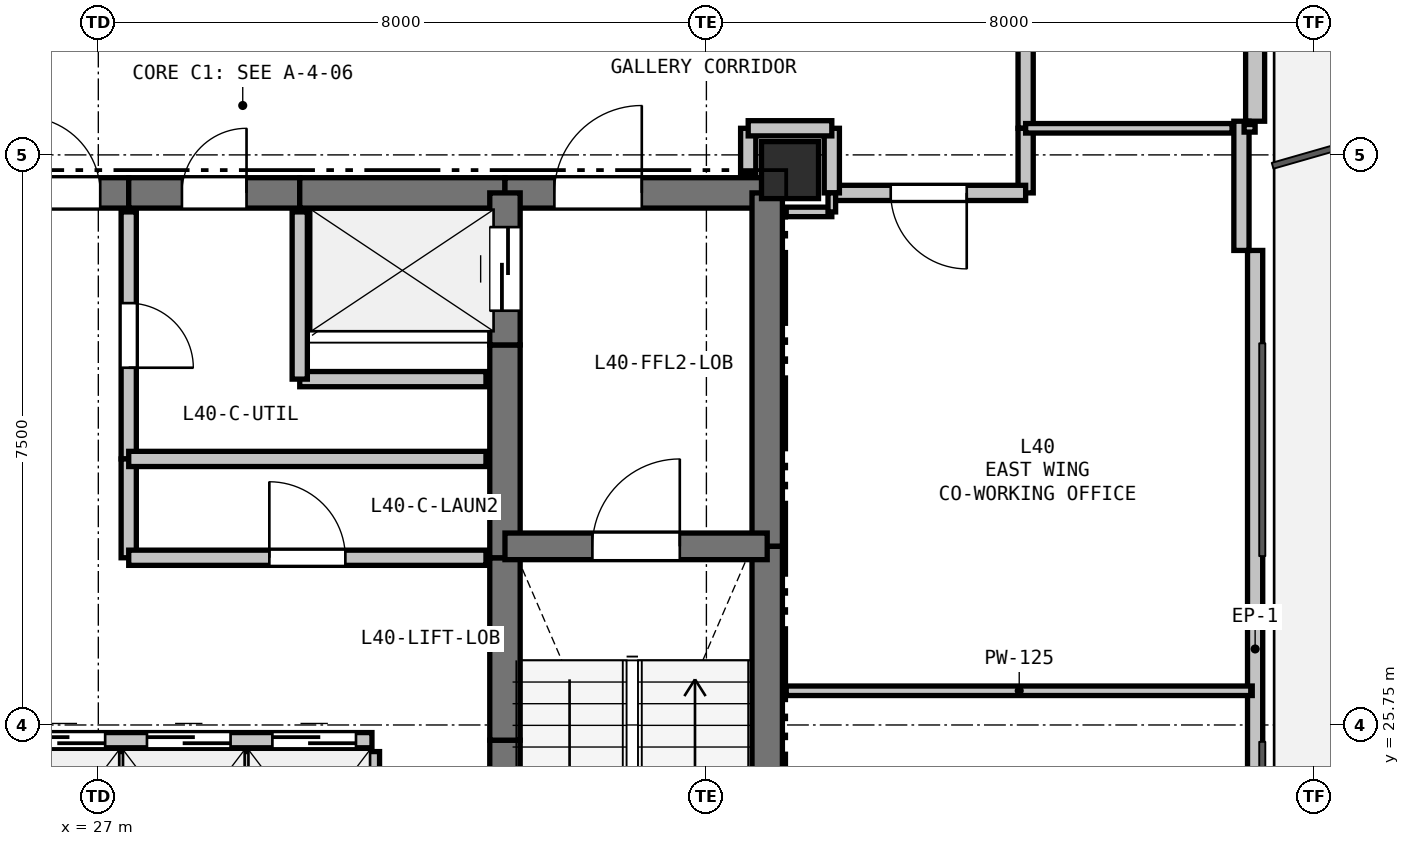
"""IFC4 building model, lengths in metres.
Left out: names, types, materials, properties, quantities, classifications, styles, units other than length and angle.
Written with IfcOpenShell. Run it as: python <this file> out.ifc"""

import sys

from ifc_helpers import new_model, si_unit, direction, frame, frame_2d, origin, origin_2d, place, context, subcontext, project, spatial, rectangle, extrude, element, fill, save


model = new_model("IFC4")
c1 = context("Model", 3, precision=1e-05, world=origin(), true_north=direction((0.0, 1.0)))
c2 = subcontext(c1, "Body", "Model", "MODEL_VIEW")
j1 = project(units=[si_unit("LENGTHUNIT", "METRE"), si_unit("PLANEANGLEUNIT", "RADIAN")], contexts=[c1])
p1 = place(None, origin())
s1 = spatial("IfcSite", under=j1, at=p1, CompositionType="ELEMENT")
p2 = place(p1, origin())
s2 = spatial("IfcBuilding", under=s1, at=p2, CompositionType="ELEMENT")
p3 = place(p2, frame((0.0, 0.0, 144.3)))
s3 = spatial("IfcBuildingStorey", under=s2, at=p3, CompositionType="ELEMENT", Elevation=144.3)
p4 = place(p3, frame((36.1, 33.05, 0.0), z_axis=(0.0, 0.0, 1.0), x_axis=(1.0, 0.0, 0.0)))
e1 = element("IfcColumn", 1, at=p4, inside=s3, PredefinedType="COLUMN", context=c2, shape_type="SweptSolid", body=[
    extrude(rectangle(XDim=0.75, YDim=0.75, at=origin_2d()), origin(), (0.0, 0.0, 1.0), 3.3),
])
p5 = place(p3, frame((42.219, 44.879, 0.0), z_axis=(0.0, 0.0, 1.0), x_axis=(0.0, -1.0, 0.0)))
e2 = element("IfcWall", 2, at=p5, inside=s3, PredefinedType="SOLIDWALL", context=c2, shape_type="SweptSolid", body=[
    extrude(rectangle(XDim=11.186, YDim=0.25, at=frame_2d((5.593, 0.0))), origin(), (0.0, 0.0, 1.0), 2.68),
])
p6 = place(p5, frame((8.109, 0.0, 0.0)))
e3 = element("IfcOpeningElement", 3, at=p6, cuts=e2, PredefinedType="OPENING", context=c2, shape_type="SweptSolid", body=[
    extrude(rectangle(XDim=1.1, YDim=2.1, at=frame_2d((0.55, 1.05))), frame((0.0, 0.135, 0.0), z_axis=(0.0, -1.0, 0.0), x_axis=(1.0, 0.0, 0.0)), (0.0, 0.0, 1.0), 0.27),
])
p7 = place(p3, frame((42.219, 31.993, 0.0), z_axis=(0.0, 0.0, 1.0), x_axis=(0.0, -1.0, 0.0)))
e4 = element("IfcWall", 4, at=p7, inside=s3, PredefinedType="PARAPET", context=c2, shape_type="SweptSolid", body=[
    extrude(rectangle(XDim=10.486, YDim=0.2, at=frame_2d((5.243, 0.0))), origin(), (0.0, 0.0, 1.0), 0.2),
])
p8 = place(p3, frame((42.039, 33.693, 0.0), z_axis=(0.0, 0.0, 1.0), x_axis=(0.0, -1.0, 0.0)))
e5 = element("IfcWall", 5, at=p8, inside=s3, PredefinedType="PARAPET", context=c2, shape_type="SweptSolid", body=[
    extrude(rectangle(XDim=1.7, YDim=0.2, at=frame_2d((0.85, 0.0))), origin(), (0.0, 0.0, 1.0), 2.68),
])
p9 = place(p3, frame((25.65, 32.75, 0.0), z_axis=(0.0, 0.0, 1.0), x_axis=(1.0, 0.0, 0.0)))
e6 = element("IfcWall", 6, at=p9, inside=s3, PredefinedType="SHEAR", context=c2, shape_type="SweptSolid", body=[
    extrude(rectangle(XDim=1.75, YDim=0.4, at=frame_2d((0.875, 0.0))), origin(), (0.0, 0.0, 1.0), 3.06),
])
p10 = place(p9, frame((0.375, 0.0, 0.0)))
e7 = element("IfcOpeningElement", 7, at=p10, cuts=e6, PredefinedType="OPENING", context=c2, shape_type="SweptSolid", body=[
    extrude(rectangle(XDim=1.0, YDim=2.15, at=frame_2d((0.5, 1.075))), frame((0.0, 0.21, 0.0), z_axis=(0.0, -1.0, 0.0), x_axis=(1.0, 0.0, 0.0)), (0.0, 0.0, 1.0), 0.42),
])
p11 = place(p3, frame((27.4, 32.75, 0.0), z_axis=(0.0, 0.0, 1.0), x_axis=(1.0, 0.0, 0.0)))
e8 = element("IfcWall", 8, at=p11, inside=s3, PredefinedType="SHEAR", context=c2, shape_type="SweptSolid", body=[
    extrude(rectangle(XDim=2.25, YDim=0.4, at=frame_2d((1.125, 0.0))), origin(), (0.0, 0.0, 1.0), 3.06),
])
p12 = place(p11, frame((0.7, 0.0, 0.0)))
e9 = element("IfcOpeningElement", 9, at=p12, cuts=e8, PredefinedType="OPENING", context=c2, shape_type="SweptSolid", body=[
    extrude(rectangle(XDim=0.85, YDim=2.1, at=frame_2d((0.425, 1.05))), frame((0.0, 0.21, 0.0), z_axis=(0.0, -1.0, 0.0), x_axis=(1.0, 0.0, 0.0)), (0.0, 0.0, 1.0), 0.42),
])
p13 = place(p3, frame((29.65, 32.75, 0.0), z_axis=(0.0, 0.0, 1.0), x_axis=(1.0, 0.0, 0.0)))
e10 = element("IfcWall", 10, at=p13, inside=s3, PredefinedType="SHEAR", context=c2, shape_type="SweptSolid", body=[
    extrude(rectangle(XDim=2.7, YDim=0.4, at=frame_2d((1.35, 0.0))), origin(), (0.0, 0.0, 1.0), 3.06),
])
p14 = place(p3, frame((32.35, 32.75, 0.0), z_axis=(0.0, 0.0, 1.0), x_axis=(1.0, 0.0, 0.0)))
e11 = element("IfcWall", 11, at=p14, inside=s3, PredefinedType="SHEAR", context=c2, shape_type="SweptSolid", body=[
    extrude(rectangle(XDim=3.45, YDim=0.4, at=frame_2d((1.725, 0.0))), origin(), (0.0, 0.0, 1.0), 3.06),
])
p15 = place(p14, frame((0.65, 0.0, 0.0)))
e12 = element("IfcOpeningElement", 12, at=p15, cuts=e11, PredefinedType="OPENING", context=c2, shape_type="SweptSolid", body=[
    extrude(rectangle(XDim=1.15, YDim=2.15, at=frame_2d((0.575, 1.075))), frame((0.0, 0.21, 0.0), z_axis=(0.0, -1.0, 0.0), x_axis=(1.0, 0.0, 0.0)), (0.0, 0.0, 1.0), 0.42),
])
p16 = place(p3, frame((35.8, 32.75, 0.0), z_axis=(0.0, 0.0, 1.0), x_axis=(0.0, -1.0, 0.0)))
e13 = element("IfcWall", 13, at=p16, inside=s3, PredefinedType="SHEAR", context=c2, shape_type="SweptSolid", body=[
    extrude(rectangle(XDim=4.65, YDim=0.4, at=frame_2d((2.325, 0.0))), origin(), (0.0, 0.0, 1.0), 3.06),
])
p17 = place(p3, frame((35.8, 28.1, 0.0), z_axis=(0.0, 0.0, 1.0), x_axis=(0.0, -1.0, 0.0)))
e14 = element("IfcWall", 14, at=p17, inside=s3, PredefinedType="SHEAR", context=c2, shape_type="SweptSolid", body=[
    extrude(rectangle(XDim=7.35, YDim=0.4, at=frame_2d((3.675, 0.0))), origin(), (0.0, 0.0, 1.0), 3.06),
])
p18 = place(p3, frame((32.35, 20.75, 0.0), z_axis=(0.0, 0.0, 1.0), x_axis=(0.0, 1.0, 0.0)))
e15 = element("IfcWall", 15, at=p18, inside=s3, PredefinedType="SHEAR", context=c2, shape_type="SweptSolid", body=[
    extrude(rectangle(XDim=4.8, YDim=0.4, at=frame_2d((2.4, 0.0))), origin(), (0.0, 0.0, 1.0), 3.06),
])
p19 = place(p3, frame((32.35, 25.55, 0.0), z_axis=(0.0, 0.0, 1.0), x_axis=(0.0, 1.0, 0.0)))
e16 = element("IfcWall", 16, at=p19, inside=s3, PredefinedType="SHEAR", context=c2, shape_type="SweptSolid", body=[
    extrude(rectangle(XDim=2.4, YDim=0.4, at=frame_2d((1.2, 0.0))), origin(), (0.0, 0.0, 1.0), 3.06),
])
p20 = place(p3, frame((32.35, 27.95, 0.0), z_axis=(0.0, 0.0, 1.0), x_axis=(0.0, 1.0, 0.0)))
e17 = element("IfcWall", 17, at=p20, inside=s3, PredefinedType="SHEAR", context=c2, shape_type="SweptSolid", body=[
    extrude(rectangle(XDim=2.8, YDim=0.4, at=frame_2d((1.4, 0.0))), origin(), (0.0, 0.0, 1.0), 3.06),
])
p21 = place(p3, frame((32.35, 30.75, 0.0), z_axis=(0.0, 0.0, 1.0), x_axis=(0.0, 1.0, 0.0)))
e18 = element("IfcWall", 18, at=p21, inside=s3, PredefinedType="SHEAR", context=c2, shape_type="SweptSolid", body=[
    extrude(rectangle(XDim=2.0, YDim=0.4, at=frame_2d((1.0, 0.0))), origin(), (0.0, 0.0, 1.0), 3.06),
])
p22 = place(p21, frame((0.45, 0.0, 0.0)))
e19 = element("IfcOpeningElement", 19, at=p22, cuts=e18, PredefinedType="OPENING", context=c2, shape_type="SweptSolid", body=[
    extrude(rectangle(XDim=1.1, YDim=2.15, at=frame_2d((0.55, 1.075))), frame((0.0, 0.21, 0.0), z_axis=(0.0, -1.0, 0.0), x_axis=(1.0, 0.0, 0.0)), (0.0, 0.0, 1.0), 0.42),
])
p23 = place(p3, frame((32.35, 28.1, 0.0), z_axis=(0.0, 0.0, 1.0), x_axis=(1.0, 0.0, 0.0)))
e20 = element("IfcWall", 20, at=p23, inside=s3, PredefinedType="SHEAR", context=c2, shape_type="SweptSolid", body=[
    extrude(rectangle(XDim=3.45, YDim=0.35, at=frame_2d((1.725, 0.0))), origin(), (0.0, 0.0, 1.0), 3.06),
])
p24 = place(p23, frame((1.15, 0.0, 0.0)))
e21 = element("IfcOpeningElement", 21, at=p24, cuts=e20, PredefinedType="OPENING", context=c2, shape_type="SweptSolid", body=[
    extrude(rectangle(XDim=1.15, YDim=2.15, at=frame_2d((0.575, 1.075))), frame((0.0, 0.185, 0.0), z_axis=(0.0, -1.0, 0.0), x_axis=(1.0, 0.0, 0.0)), (0.0, 0.0, 1.0), 0.37),
])
p25 = place(p3, frame((25.65, 25.55, 0.0), z_axis=(0.0, 0.0, 1.0), x_axis=(1.0, 0.0, 0.0)))
e22 = element("IfcWall", 22, at=p25, inside=s3, PredefinedType="PARTITIONING", context=c2, shape_type="SweptSolid", body=[
    extrude(rectangle(XDim=4.95, YDim=0.2, at=frame_2d((2.475, 0.0))), origin(), (0.0, 0.0, 1.0), 3.06),
])
p26 = place(p25, frame((0.34, 0.0, 0.0)))
e23 = element("IfcOpeningElement", 23, at=p26, cuts=e22, PredefinedType="OPENING", context=c2, shape_type="SweptSolid", body=[
    extrude(rectangle(XDim=1.1, YDim=2.15, at=frame_2d((0.55, 1.075))), frame((0.0, 0.11, 0.0), z_axis=(0.0, -1.0, 0.0), x_axis=(1.0, 0.0, 0.0)), (0.0, 0.0, 1.0), 0.22),
])
p27 = place(p25, frame((1.99, 0.0, 0.0)))
e24 = element("IfcOpeningElement", 24, at=p27, cuts=e22, PredefinedType="OPENING", context=c2, shape_type="SweptSolid", body=[
    extrude(rectangle(XDim=1.1, YDim=2.15, at=frame_2d((0.55, 1.075))), frame((0.0, 0.11, 0.0), z_axis=(0.0, -1.0, 0.0), x_axis=(1.0, 0.0, 0.0)), (0.0, 0.0, 1.0), 0.22),
])
p28 = place(p25, frame((3.64, 0.0, 0.0)))
e25 = element("IfcOpeningElement", 25, at=p28, cuts=e22, PredefinedType="OPENING", context=c2, shape_type="SweptSolid", body=[
    extrude(rectangle(XDim=1.1, YDim=2.15, at=frame_2d((0.55, 1.075))), frame((0.0, 0.11, 0.0), z_axis=(0.0, -1.0, 0.0), x_axis=(1.0, 0.0, 0.0)), (0.0, 0.0, 1.0), 0.22),
])
p29 = place(p3, frame((32.1, 30.3, 0.0), z_axis=(0.0, 0.0, 1.0), x_axis=(-1.0, 0.0, 0.0)))
e26 = element("IfcWall", 26, at=p29, inside=s3, PredefinedType="PARTITIONING", context=c2, shape_type="SweptSolid", body=[
    extrude(rectangle(XDim=2.45, YDim=0.2, at=frame_2d((1.225, 0.0))), origin(), (0.0, 0.0, 1.0), 3.06),
])
p30 = place(p3, frame((29.65, 30.3, 0.0), z_axis=(0.0, 0.0, 1.0), x_axis=(0.0, 1.0, 0.0)))
e27 = element("IfcWall", 27, at=p30, inside=s3, PredefinedType="PARTITIONING", context=c2, shape_type="SweptSolid", body=[
    extrude(rectangle(XDim=2.2, YDim=0.2, at=frame_2d((1.1, 0.0))), origin(), (0.0, 0.0, 1.0), 3.06),
])
p31 = place(p3, frame((27.3, 25.4, 0.0), z_axis=(0.0, 0.0, 1.0), x_axis=(0.0, -1.0, 0.0)))
e28 = element("IfcWall", 28, at=p31, inside=s3, PredefinedType="PARTITIONING", context=c2, shape_type="SweptSolid", body=[
    extrude(rectangle(XDim=2.2, YDim=0.1, at=frame_2d((1.1, 0.0))), origin(), (0.0, 0.0, 1.0), 3.06),
])
p32 = place(p3, frame((28.95, 25.4, 0.0), z_axis=(0.0, 0.0, 1.0), x_axis=(0.0, -1.0, 0.0)))
e29 = element("IfcWall", 29, at=p32, inside=s3, PredefinedType="PARTITIONING", context=c2, shape_type="SweptSolid", body=[
    extrude(rectangle(XDim=2.2, YDim=0.125, at=frame_2d((1.1, 0.0))), origin(), (0.0, 0.0, 1.0), 3.06),
])
p33 = place(p3, frame((30.6, 25.4, 0.0), z_axis=(0.0, 0.0, 1.0), x_axis=(0.0, -1.0, 0.0)))
e30 = element("IfcWall", 30, at=p33, inside=s3, PredefinedType="PARTITIONING", context=c2, shape_type="SweptSolid", body=[
    extrude(rectangle(XDim=2.2, YDim=0.2, at=frame_2d((1.1, 0.0))), origin(), (0.0, 0.0, 1.0), 3.06),
])
p34 = place(p3, frame((27.4, 32.5, 0.0), z_axis=(0.0, 0.0, 1.0), x_axis=(0.0, -1.0, 0.0)))
e31 = element("IfcWall", 31, at=p34, inside=s3, PredefinedType="PARTITIONING", context=c2, shape_type="SweptSolid", body=[
    extrude(rectangle(XDim=3.25, YDim=0.2, at=frame_2d((1.625, 0.0))), origin(), (0.0, 0.0, 1.0), 3.06),
])
p35 = place(p34, frame((1.2, 0.0, 0.0)))
e32 = element("IfcOpeningElement", 32, at=p35, cuts=e31, PredefinedType="OPENING", context=c2, shape_type="SweptSolid", body=[
    extrude(rectangle(XDim=0.85, YDim=2.1, at=frame_2d((0.425, 1.05))), frame((0.0, 0.11, 0.0), z_axis=(0.0, -1.0, 0.0), x_axis=(1.0, 0.0, 0.0)), (0.0, 0.0, 1.0), 0.22),
])
p36 = place(p3, frame((27.4, 29.25, 0.0), z_axis=(0.0, 0.0, 1.0), x_axis=(0.0, -1.0, 0.0)))
e33 = element("IfcWall", 33, at=p36, inside=s3, PredefinedType="PARTITIONING", context=c2, shape_type="SweptSolid", body=[
    extrude(rectangle(XDim=1.3, YDim=0.2, at=frame_2d((0.65, 0.0))), origin(), (0.0, 0.0, 1.0), 3.06),
])
p37 = place(p3, frame((27.4, 27.95, 0.0), z_axis=(0.0, 0.0, 1.0), x_axis=(1.0, 0.0, 0.0)))
e34 = element("IfcWall", 34, at=p37, inside=s3, PredefinedType="PARTITIONING", context=c2, shape_type="SweptSolid", body=[
    extrude(rectangle(XDim=4.7, YDim=0.2, at=frame_2d((2.35, 0.0))), origin(), (0.0, 0.0, 1.0), 3.06),
])
p38 = place(p37, frame((1.85, 0.0, 0.0)))
e35 = element("IfcOpeningElement", 35, at=p38, cuts=e34, PredefinedType="OPENING", context=c2, shape_type="SweptSolid", body=[
    extrude(rectangle(XDim=1.0, YDim=2.15, at=frame_2d((0.5, 1.075))), frame((0.0, 0.11, 0.0), z_axis=(0.0, -1.0, 0.0), x_axis=(1.0, 0.0, 0.0)), (0.0, 0.0, 1.0), 0.22),
])
p39 = place(p3, frame((35.55, 33.6, 0.0), z_axis=(0.0, 0.0, 1.0), x_axis=(0.0, -1.0, 0.0)))
e36 = element("IfcWall", 36, at=p39, inside=s3, PredefinedType="PARTITIONING", context=c2, shape_type="SweptSolid", body=[
    extrude(rectangle(XDim=0.6, YDim=0.2, at=frame_2d((0.3, 0.0))), origin(), (0.0, 0.0, 1.0), 2.585),
])
p40 = place(p3, frame((39.2, 35.35, 0.0), z_axis=(0.0, 0.0, 1.0), x_axis=(0.0, -1.0, 0.0)))
e37 = element("IfcWall", 37, at=p40, inside=s3, PredefinedType="PARTITIONING", context=c2, shape_type="SweptSolid", body=[
    extrude(rectangle(XDim=1.75, YDim=0.2, at=frame_2d((0.875, 0.0))), origin(), (0.0, 0.0, 1.0), 3.06),
])
p41 = place(p3, frame((39.2, 33.6, 0.0), z_axis=(0.0, 0.0, 1.0), x_axis=(0.0, -1.0, 0.0)))
e38 = element("IfcWall", 38, at=p41, inside=s3, PredefinedType="PARTITIONING", context=c2, shape_type="SweptSolid", body=[
    extrude(rectangle(XDim=0.85, YDim=0.2, at=frame_2d((0.425, 0.0))), origin(), (0.0, 0.0, 1.0), 3.06),
])
p42 = place(p3, frame((39.2, 32.75, 0.0), z_axis=(0.0, 0.0, 1.0), x_axis=(-1.0, 0.0, 0.0)))
e39 = element("IfcWall", 39, at=p42, inside=s3, PredefinedType="PARTITIONING", context=c2, shape_type="SweptSolid", body=[
    extrude(rectangle(XDim=2.55, YDim=0.2, at=frame_2d((1.275, 0.0))), origin(), (0.0, 0.0, 1.0), 3.06),
])
p43 = place(p42, frame((0.775, 0.0, 0.0)))
e40 = element("IfcOpeningElement", 40, at=p43, cuts=e39, PredefinedType="OPENING", context=c2, shape_type="SweptSolid", body=[
    extrude(rectangle(XDim=1.0, YDim=2.15, at=frame_2d((0.5, 1.075))), frame((0.0, 0.11, 0.0), z_axis=(0.0, -1.0, 0.0), x_axis=(1.0, 0.0, 0.0)), (0.0, 0.0, 1.0), 0.22),
])
p44 = place(p3, frame((36.65, 32.75, 0.0), z_axis=(0.0, 0.0, 1.0), x_axis=(0.0, 1.0, 0.0)))
e41 = element("IfcWall", 41, at=p44, inside=s3, PredefinedType="PARTITIONING", context=c2, shape_type="SweptSolid", body=[
    extrude(rectangle(XDim=0.85, YDim=0.2, at=frame_2d((0.425, 0.0))), origin(), (0.0, 0.0, 1.0), 2.433),
])
p45 = place(p3, frame((36.65, 33.6, 0.0), z_axis=(0.0, 0.0, 1.0), x_axis=(-1.0, 0.0, 0.0)))
e42 = element("IfcWall", 42, at=p45, inside=s3, PredefinedType="PARTITIONING", context=c2, shape_type="SweptSolid", body=[
    extrude(rectangle(XDim=1.1, YDim=0.2, at=frame_2d((0.55, 0.0))), origin(), (0.0, 0.0, 1.0), 2.433),
])
p46 = place(p3, frame((32.1, 29.25, 0.0), z_axis=(0.0, 0.0, 1.0), x_axis=(-1.0, 0.0, 0.0)))
e43 = element("IfcWall", 43, at=p46, inside=s3, PredefinedType="PARTITIONING", context=c2, shape_type="SweptSolid", body=[
    extrude(rectangle(XDim=4.7, YDim=0.2, at=frame_2d((2.35, 0.0))), origin(), (0.0, 0.0, 1.0), 3.06),
])
p47 = place(p3, frame((36.05, 32.5, 0.0), z_axis=(0.0, 0.0, 1.0), x_axis=(1.0, 0.0, 0.0)))
e44 = element("IfcWall", 44, at=p47, inside=s3, PredefinedType="PARTITIONING", context=c2, shape_type="SweptSolid", body=[
    extrude(rectangle(XDim=0.6, YDim=0.125, at=frame_2d((0.3, 0.0))), origin(), (0.0, 0.0, 1.0), 2.585),
])
p48 = place(p3, frame((36.65, 32.5, 0.0), z_axis=(0.0, 0.0, 1.0), x_axis=(0.0, 1.0, 0.0)))
e45 = element("IfcWall", 45, at=p48, inside=s3, PredefinedType="PARTITIONING", context=c2, shape_type="SweptSolid", body=[
    extrude(rectangle(XDim=0.25, YDim=0.1, at=frame_2d((0.125, 0.0))), origin(), (0.0, 0.0, 1.0), 3.06),
])
p49 = place(p3, frame((39.2, 33.6, 0.0), z_axis=(0.0, 0.0, 1.0), x_axis=(1.0, 0.0, 0.0)))
e46 = element("IfcWall", 46, at=p49, inside=s3, PredefinedType="PARTITIONING", context=c2, shape_type="SweptSolid", body=[
    extrude(rectangle(XDim=2.715, YDim=0.125, at=frame_2d((1.358, 0.0))), origin(), (0.0, 0.0, 1.0), 2.365),
])
p50 = place(p3, frame((42.074, 33.6, 0.0), z_axis=(0.0, 0.0, 1.0), x_axis=(1.0, 0.0, 0.0)))
e47 = element("IfcWall", 47, at=p50, inside=s3, PredefinedType="PARTITIONING", context=c2, shape_type="SweptSolid", body=[
    extrude(rectangle(XDim=0.145, YDim=0.1, at=frame_2d((0.072, 0.0))), origin(), (0.0, 0.0, 1.0), 3.06),
])
p51 = place(p3, frame((42.181, 26.2, 0.0), z_axis=(0.0, 0.0, 1.0), x_axis=(-1.0, 0.0, 0.0)))
e48 = element("IfcWall", 48, at=p51, inside=s3, PredefinedType="PARTITIONING", context=c2, shape_type="SweptSolid", body=[
    extrude(rectangle(XDim=6.131, YDim=0.125, at=frame_2d((3.065, 0.0))), origin(), (0.0, 0.0, 1.0), 2.365),
])
p52 = place(p26, origin())
e49 = element("IfcDoor", 49, at=p52, inside=s3, OperationType="SLIDING_TO_LEFT", PredefinedType="DOOR", context=c2, shape_type="SweptSolid", body=[
    extrude(rectangle(XDim=1.1, YDim=2.15, at=frame_2d((0.55, 1.075))), frame((0.0, 0.025, 0.0), z_axis=(0.0, -1.0, 0.0), x_axis=(1.0, 0.0, 0.0)), (0.0, 0.0, 1.0), 0.05),
])
fill(e23, e49)
p53 = place(p27, origin())
e50 = element("IfcDoor", 50, at=p53, inside=s3, OperationType="SLIDING_TO_LEFT", PredefinedType="DOOR", context=c2, shape_type="SweptSolid", body=[
    extrude(rectangle(XDim=1.1, YDim=2.15, at=frame_2d((0.55, 1.075))), frame((0.0, 0.025, 0.0), z_axis=(0.0, -1.0, 0.0), x_axis=(1.0, 0.0, 0.0)), (0.0, 0.0, 1.0), 0.05),
])
fill(e24, e50)
p54 = place(p28, origin())
e51 = element("IfcDoor", 51, at=p54, inside=s3, OperationType="SLIDING_TO_LEFT", PredefinedType="DOOR", context=c2, shape_type="SweptSolid", body=[
    extrude(rectangle(XDim=1.1, YDim=2.15, at=frame_2d((0.55, 1.075))), frame((0.0, 0.025, 0.0), z_axis=(0.0, -1.0, 0.0), x_axis=(1.0, 0.0, 0.0)), (0.0, 0.0, 1.0), 0.05),
])
fill(e25, e51)
p55 = place(p10, origin())
e52 = element("IfcDoor", 52, at=p55, inside=s3, OperationType="SINGLE_SWING_LEFT", PredefinedType="DOOR", context=c2, shape_type="SweptSolid", body=[
    extrude(rectangle(XDim=1.0, YDim=2.15, at=frame_2d((0.5, 1.075))), frame((0.0, 0.025, 0.0), z_axis=(0.0, -1.0, 0.0), x_axis=(1.0, 0.0, 0.0)), (0.0, 0.0, 1.0), 0.05),
])
fill(e7, e52)
p56 = place(p22, origin())
e53 = element("IfcDoor", 53, at=p56, inside=s3, OperationType="SLIDING_TO_LEFT", PredefinedType="DOOR", context=c2, shape_type="SweptSolid", body=[
    extrude(rectangle(XDim=1.1, YDim=2.15, at=frame_2d((0.55, 1.075))), frame((0.0, 0.025, 0.0), z_axis=(0.0, -1.0, 0.0), x_axis=(1.0, 0.0, 0.0)), (0.0, 0.0, 1.0), 0.05),
])
fill(e19, e53)
p57 = place(p24, origin())
e54 = element("IfcDoor", 54, at=p57, inside=s3, OperationType="SINGLE_SWING_RIGHT", PredefinedType="DOOR", context=c2, shape_type="SweptSolid", body=[
    extrude(rectangle(XDim=1.15, YDim=2.15, at=frame_2d((0.575, 1.075))), frame((0.0, 0.025, 0.0), z_axis=(0.0, -1.0, 0.0), x_axis=(1.0, 0.0, 0.0)), (0.0, 0.0, 1.0), 0.05),
])
fill(e21, e54)
p58 = place(p15, origin())
e55 = element("IfcDoor", 55, at=p58, inside=s3, OperationType="SINGLE_SWING_RIGHT", PredefinedType="DOOR", context=c2, shape_type="SweptSolid", body=[
    extrude(rectangle(XDim=1.15, YDim=2.15, at=frame_2d((0.575, 1.075))), frame((0.0, 0.025, 0.0), z_axis=(0.0, -1.0, 0.0), x_axis=(1.0, 0.0, 0.0)), (0.0, 0.0, 1.0), 0.05),
])
fill(e12, e55)
p59 = place(p35, origin())
e56 = element("IfcDoor", 56, at=p59, inside=s3, OperationType="SINGLE_SWING_RIGHT", PredefinedType="DOOR", context=c2, shape_type="SweptSolid", body=[
    extrude(rectangle(XDim=0.85, YDim=2.1, at=frame_2d((0.425, 1.05))), frame((0.0, 0.025, 0.0), z_axis=(0.0, -1.0, 0.0), x_axis=(1.0, 0.0, 0.0)), (0.0, 0.0, 1.0), 0.05),
])
fill(e32, e56)
p60 = place(p38, origin())
e57 = element("IfcDoor", 57, at=p60, inside=s3, OperationType="SINGLE_SWING_LEFT", PredefinedType="DOOR", context=c2, shape_type="SweptSolid", body=[
    extrude(rectangle(XDim=1.0, YDim=2.15, at=frame_2d((0.5, 1.075))), frame((0.0, 0.025, 0.0), z_axis=(0.0, -1.0, 0.0), x_axis=(1.0, 0.0, 0.0)), (0.0, 0.0, 1.0), 0.05),
])
fill(e35, e57)
p61 = place(p12, origin())
e58 = element("IfcDoor", 58, at=p61, inside=s3, OperationType="SINGLE_SWING_RIGHT", PredefinedType="DOOR", context=c2, shape_type="SweptSolid", body=[
    extrude(rectangle(XDim=0.85, YDim=2.1, at=frame_2d((0.425, 1.05))), frame((0.0, 0.025, 0.0), z_axis=(0.0, -1.0, 0.0), x_axis=(1.0, 0.0, 0.0)), (0.0, 0.0, 1.0), 0.05),
])
fill(e9, e58)
p62 = place(p43, origin())
e59 = element("IfcDoor", 59, at=p62, inside=s3, OperationType="SINGLE_SWING_LEFT", PredefinedType="DOOR", context=c2, shape_type="SweptSolid", body=[
    extrude(rectangle(XDim=1.0, YDim=2.15, at=frame_2d((0.5, 1.075))), frame((0.0, 0.025, 0.0), z_axis=(0.0, -1.0, 0.0), x_axis=(1.0, 0.0, 0.0)), (0.0, 0.0, 1.0), 0.05),
])
fill(e40, e59)
save(model, sys.argv[1])
